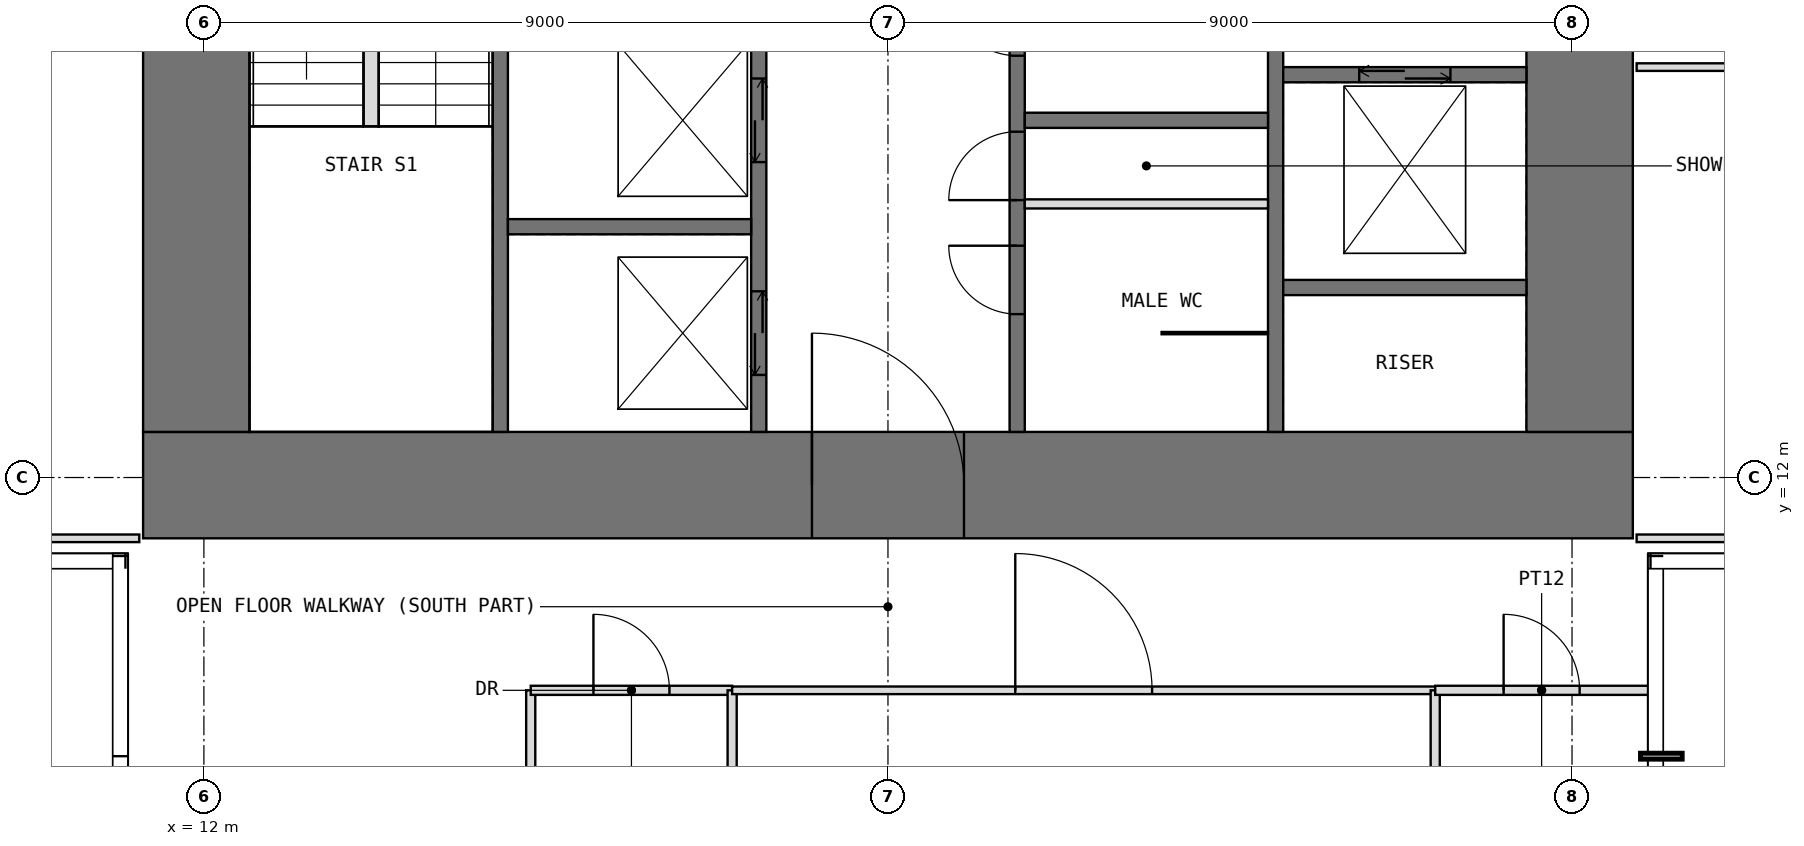
"""IFC4 building model, lengths in metres.
Left out: names, types, materials, properties, quantities, classifications, styles, units other than length and angle.
Written with IfcOpenShell. Run it as: python <this file> out.ifc"""

import sys

from ifc_helpers import new_model, si_unit, direction, frame, frame_2d, origin, place, context, subcontext, project, spatial, rectangle, extrude, element, fill, save


model = new_model("IFC4")
c1 = context("Model", 3, precision=1e-05, world=origin(), true_north=direction((0.0, 1.0)))
c2 = subcontext(c1, "Body", "Model", "MODEL_VIEW")
j1 = project(units=[si_unit("LENGTHUNIT", "METRE"), si_unit("PLANEANGLEUNIT", "RADIAN")], contexts=[c1])
p1 = place(None, origin())
s1 = spatial("IfcSite", under=j1, at=p1, CompositionType="ELEMENT")
p2 = place(p1, origin())
s2 = spatial("IfcBuilding", under=s1, at=p2, CompositionType="ELEMENT")
p3 = place(p2, frame((0.0, 0.0, 170.5)))
s3 = spatial("IfcBuildingStorey", under=s2, at=p3, CompositionType="ELEMENT", Elevation=170.5)
p4 = place(p3, frame((11.2, 11.9, -0.05), z_axis=(0.0, 0.0, 1.0), x_axis=(1.0, 0.0, 0.0)))
e1 = element("IfcWall", 1, at=p4, inside=s3, PredefinedType="SHEAR", context=c2, shape_type="SweptSolid", body=[
    extrude(rectangle(XDim=19.6, YDim=1.4, at=frame_2d((9.8, 0.0))), origin(), (0.0, 0.0, 1.0), 4.0),
])
p5 = place(p4, frame((8.8, 0.0, 0.05)))
e2 = element("IfcOpeningElement", 2, at=p5, cuts=e1, PredefinedType="OPENING", context=c2, shape_type="SweptSolid", body=[
    extrude(rectangle(XDim=2.0, YDim=2.2, at=frame_2d((1.0, 1.1))), frame((0.0, 0.71, 0.0), z_axis=(0.0, -1.0, 0.0), x_axis=(1.0, 0.0, 0.0)), (0.0, 0.0, 1.0), 1.42),
])
p6 = place(p3, frame((11.9, 12.6, -0.05), z_axis=(0.0, 0.0, 1.0), x_axis=(0.0, 1.0, 0.0)))
e3 = element("IfcWall", 3, at=p6, inside=s3, PredefinedType="SHEAR", context=c2, shape_type="SweptSolid", body=[
    extrude(rectangle(XDim=16.8, YDim=1.4, at=frame_2d((8.4, 0.0))), origin(), (0.0, 0.0, 1.0), 4.0),
])
p7 = place(p6, frame((9.9, 0.0, 0.05)))
e4 = element("IfcOpeningElement", 4, at=p7, cuts=e3, PredefinedType="OPENING", context=c2, shape_type="SweptSolid", body=[
    extrude(rectangle(XDim=1.0, YDim=2.2, at=frame_2d((0.5, 1.1))), frame((0.0, 0.71, 0.0), z_axis=(0.0, -1.0, 0.0), x_axis=(1.0, 0.0, 0.0)), (0.0, 0.0, 1.0), 1.42),
])
p8 = place(p3, frame((30.1, 12.6, -0.05), z_axis=(0.0, 0.0, 1.0), x_axis=(0.0, 1.0, 0.0)))
e5 = element("IfcWall", 5, at=p8, inside=s3, PredefinedType="SHEAR", context=c2, shape_type="SweptSolid", body=[
    extrude(rectangle(XDim=16.8, YDim=1.4, at=frame_2d((8.4, 0.0))), origin(), (0.0, 0.0, 1.0), 4.0),
])
p9 = place(p8, frame((5.9, 0.0, 0.05)))
e6 = element("IfcOpeningElement", 6, at=p9, cuts=e5, PredefinedType="OPENING", context=c2, shape_type="SweptSolid", body=[
    extrude(rectangle(XDim=1.0, YDim=2.2, at=frame_2d((0.5, 1.1))), frame((0.0, 0.71, 0.0), z_axis=(0.0, -1.0, 0.0), x_axis=(1.0, 0.0, 0.0)), (0.0, 0.0, 1.0), 1.42),
])
p10 = place(p3, frame((15.9, 12.6, -0.05), z_axis=(0.0, 0.0, 1.0), x_axis=(0.0, 1.0, 0.0)))
e7 = element("IfcWall", 7, at=p10, inside=s3, PredefinedType="SHEAR", context=c2, shape_type="SweptSolid", body=[
    extrude(rectangle(XDim=16.8, YDim=0.2, at=frame_2d((8.4, 0.0))), origin(), (0.0, 0.0, 1.0), 4.0),
])
p11 = place(p10, frame((8.9, 0.0, 0.05)))
e8 = element("IfcOpeningElement", 8, at=p11, cuts=e7, PredefinedType="OPENING", context=c2, shape_type="SweptSolid", body=[
    extrude(rectangle(XDim=1.0, YDim=2.2, at=frame_2d((0.5, 1.1))), frame((0.0, 0.11, 0.0), z_axis=(0.0, -1.0, 0.0), x_axis=(1.0, 0.0, 0.0)), (0.0, 0.0, 1.0), 0.22),
])
p12 = place(p3, frame((19.3, 12.6, -0.05), z_axis=(0.0, 0.0, 1.0), x_axis=(0.0, 1.0, 0.0)))
e9 = element("IfcWall", 9, at=p12, inside=s3, PredefinedType="SHEAR", context=c2, shape_type="SweptSolid", body=[
    extrude(rectangle(XDim=16.8, YDim=0.2, at=frame_2d((8.4, 0.0))), origin(), (0.0, 0.0, 1.0), 4.0),
])
p13 = place(p12, frame((8.7, 0.0, 0.05)))
e10 = element("IfcOpeningElement", 10, at=p13, cuts=e9, PredefinedType="OPENING", context=c2, shape_type="SweptSolid", body=[
    extrude(rectangle(XDim=1.0, YDim=2.2, at=frame_2d((0.5, 1.1))), frame((0.0, 0.11, 0.0), z_axis=(0.0, -1.0, 0.0), x_axis=(1.0, 0.0, 0.0)), (0.0, 0.0, 1.0), 0.22),
])
p14 = place(p12, frame((10.85, 0.0, 0.05)))
e11 = element("IfcOpeningElement", 11, at=p14, cuts=e9, PredefinedType="OPENING", context=c2, shape_type="SweptSolid", body=[
    extrude(rectangle(XDim=0.9, YDim=2.2, at=frame_2d((0.45, 1.1))), frame((0.0, 0.11, 0.0), z_axis=(0.0, -1.0, 0.0), x_axis=(1.0, 0.0, 0.0)), (0.0, 0.0, 1.0), 0.22),
])
p15 = place(p12, frame((13.3, 0.0, 0.05)))
e12 = element("IfcOpeningElement", 12, at=p15, cuts=e9, PredefinedType="OPENING", context=c2, shape_type="SweptSolid", body=[
    extrude(rectangle(XDim=1.0, YDim=2.2, at=frame_2d((0.5, 1.1))), frame((0.0, 0.11, 0.0), z_axis=(0.0, -1.0, 0.0), x_axis=(1.0, 0.0, 0.0)), (0.0, 0.0, 1.0), 0.22),
])
p16 = place(p12, frame((15.55, 0.0, 0.05)))
e13 = element("IfcOpeningElement", 13, at=p16, cuts=e9, PredefinedType="OPENING", context=c2, shape_type="SweptSolid", body=[
    extrude(rectangle(XDim=0.9, YDim=2.2, at=frame_2d((0.45, 1.1))), frame((0.0, 0.11, 0.0), z_axis=(0.0, -1.0, 0.0), x_axis=(1.0, 0.0, 0.0)), (0.0, 0.0, 1.0), 0.22),
])
p17 = place(p12, frame((0.75, 0.0, 0.05)))
e14 = element("IfcOpeningElement", 14, at=p17, cuts=e9, PredefinedType="OPENING", context=c2, shape_type="SweptSolid", body=[
    extrude(rectangle(XDim=1.1, YDim=2.2, at=frame_2d((0.55, 1.1))), frame((0.0, 0.11, 0.0), z_axis=(0.0, -1.0, 0.0), x_axis=(1.0, 0.0, 0.0)), (0.0, 0.0, 1.0), 0.22),
])
p18 = place(p12, frame((3.55, 0.0, 0.05)))
e15 = element("IfcOpeningElement", 15, at=p18, cuts=e9, PredefinedType="OPENING", context=c2, shape_type="SweptSolid", body=[
    extrude(rectangle(XDim=1.1, YDim=2.2, at=frame_2d((0.55, 1.1))), frame((0.0, 0.11, 0.0), z_axis=(0.0, -1.0, 0.0), x_axis=(1.0, 0.0, 0.0)), (0.0, 0.0, 1.0), 0.22),
])
p19 = place(p12, frame((6.35, 0.0, 0.05)))
e16 = element("IfcOpeningElement", 16, at=p19, cuts=e9, PredefinedType="OPENING", context=c2, shape_type="SweptSolid", body=[
    extrude(rectangle(XDim=1.1, YDim=2.2, at=frame_2d((0.55, 1.1))), frame((0.0, 0.11, 0.0), z_axis=(0.0, -1.0, 0.0), x_axis=(1.0, 0.0, 0.0)), (0.0, 0.0, 1.0), 0.22),
])
p20 = place(p3, frame((22.7, 12.6, -0.05), z_axis=(0.0, 0.0, 1.0), x_axis=(0.0, 1.0, 0.0)))
e17 = element("IfcWall", 17, at=p20, inside=s3, PredefinedType="SHEAR", context=c2, shape_type="SweptSolid", body=[
    extrude(rectangle(XDim=16.8, YDim=0.2, at=frame_2d((8.4, 0.0))), origin(), (0.0, 0.0, 1.0), 4.0),
])
p21 = place(p20, frame((3.05, 0.0, 0.05)))
e18 = element("IfcOpeningElement", 18, at=p21, cuts=e17, PredefinedType="OPENING", context=c2, shape_type="SweptSolid", body=[
    extrude(rectangle(XDim=0.9, YDim=2.2, at=frame_2d((0.45, 1.1))), frame((0.0, 0.11, 0.0), z_axis=(0.0, -1.0, 0.0), x_axis=(1.0, 0.0, 0.0)), (0.0, 0.0, 1.0), 0.22),
])
p22 = place(p20, frame((7.1, 0.0, 0.05)))
e19 = element("IfcOpeningElement", 19, at=p22, cuts=e17, PredefinedType="OPENING", context=c2, shape_type="SweptSolid", body=[
    extrude(rectangle(XDim=1.0, YDim=2.2, at=frame_2d((0.5, 1.1))), frame((0.0, 0.11, 0.0), z_axis=(0.0, -1.0, 0.0), x_axis=(1.0, 0.0, 0.0)), (0.0, 0.0, 1.0), 0.22),
])
p23 = place(p20, frame((1.55, 0.0, 0.05)))
e20 = element("IfcOpeningElement", 20, at=p23, cuts=e17, PredefinedType="OPENING", context=c2, shape_type="SweptSolid", body=[
    extrude(rectangle(XDim=0.9, YDim=2.2, at=frame_2d((0.45, 1.1))), frame((0.0, 0.11, 0.0), z_axis=(0.0, -1.0, 0.0), x_axis=(1.0, 0.0, 0.0)), (0.0, 0.0, 1.0), 0.22),
])
p24 = place(p20, frame((4.95, 0.0, 0.05)))
e21 = element("IfcOpeningElement", 21, at=p24, cuts=e17, PredefinedType="OPENING", context=c2, shape_type="SweptSolid", body=[
    extrude(rectangle(XDim=0.9, YDim=2.2, at=frame_2d((0.45, 1.1))), frame((0.0, 0.11, 0.0), z_axis=(0.0, -1.0, 0.0), x_axis=(1.0, 0.0, 0.0)), (0.0, 0.0, 1.0), 0.22),
])
p25 = place(p20, frame((9.4, 0.0, 0.05)))
e22 = element("IfcOpeningElement", 22, at=p25, cuts=e17, PredefinedType="OPENING", context=c2, shape_type="SweptSolid", body=[
    extrude(rectangle(XDim=1.0, YDim=2.2, at=frame_2d((0.5, 1.1))), frame((0.0, 0.11, 0.0), z_axis=(0.0, -1.0, 0.0), x_axis=(1.0, 0.0, 0.0)), (0.0, 0.0, 1.0), 0.22),
])
p26 = place(p20, frame((12.2, 0.0, 0.05)))
e23 = element("IfcOpeningElement", 23, at=p26, cuts=e17, PredefinedType="OPENING", context=c2, shape_type="SweptSolid", body=[
    extrude(rectangle(XDim=1.0, YDim=2.2, at=frame_2d((0.5, 1.1))), frame((0.0, 0.11, 0.0), z_axis=(0.0, -1.0, 0.0), x_axis=(1.0, 0.0, 0.0)), (0.0, 0.0, 1.0), 0.22),
])
p27 = place(p3, frame((26.1, 12.6, -0.05), z_axis=(0.0, 0.0, 1.0), x_axis=(0.0, 1.0, 0.0)))
e24 = element("IfcWall", 24, at=p27, inside=s3, PredefinedType="SHEAR", context=c2, shape_type="SweptSolid", body=[
    extrude(rectangle(XDim=16.8, YDim=0.2, at=frame_2d((8.4, 0.0))), origin(), (0.0, 0.0, 1.0), 4.0),
])
p28 = place(p27, frame((6.9, 0.0, 0.05)))
e25 = element("IfcOpeningElement", 25, at=p28, cuts=e24, PredefinedType="OPENING", context=c2, shape_type="SweptSolid", body=[
    extrude(rectangle(XDim=1.0, YDim=2.2, at=frame_2d((0.5, 1.1))), frame((0.0, 0.11, 0.0), z_axis=(0.0, -1.0, 0.0), x_axis=(1.0, 0.0, 0.0)), (0.0, 0.0, 1.0), 0.22),
])
for number, where, z_axis, x_axis in (
    (26, (16.0, 15.3, -0.05), (0.0, 0.0, 1.0), (1.0, 0.0, 0.0)),
    (27, (22.8, 16.7, -0.05), (0.0, 0.0, 1.0), (1.0, 0.0, 0.0)),
    (28, (26.2, 14.5, -0.05), (0.0, 0.0, 1.0), (1.0, 0.0, 0.0)),
):
    element("IfcWall", number, at=place(p3, frame(where, z_axis=z_axis, x_axis=x_axis)), inside=s3, PredefinedType="SHEAR", context=c2, shape_type="SweptSolid", body=[
        extrude(rectangle(XDim=3.2, YDim=0.2, at=frame_2d((1.6, 0.0))), origin(), (0.0, 0.0, 1.0), 4.0),
    ])
p29 = place(p3, frame((26.2, 17.3, -0.05), z_axis=(0.0, 0.0, 1.0), x_axis=(1.0, 0.0, 0.0)))
e29 = element("IfcWall", 29, at=p29, inside=s3, PredefinedType="SHEAR", context=c2, shape_type="SweptSolid", body=[
    extrude(rectangle(XDim=3.2, YDim=0.2, at=frame_2d((1.6, 0.0))), origin(), (0.0, 0.0, 1.0), 4.0),
])
p30 = place(p29, frame((1.0, 0.0, 0.05)))
e30 = element("IfcOpeningElement", 30, at=p30, cuts=e29, PredefinedType="OPENING", context=c2, shape_type="SweptSolid", body=[
    extrude(rectangle(XDim=1.2, YDim=2.2, at=frame_2d((0.6, 1.1))), frame((0.0, 0.11, 0.0), z_axis=(0.0, -1.0, 0.0), x_axis=(1.0, 0.0, 0.0)), (0.0, 0.0, 1.0), 0.22),
])
p31 = place(p3, frame((22.8, 15.6, 0.0), z_axis=(0.0, 0.0, 1.0), x_axis=(1.0, 0.0, 0.0)))
e31 = element("IfcWall", 31, at=p31, inside=s3, PredefinedType="PARTITIONING", context=c2, shape_type="SweptSolid", body=[
    extrude(rectangle(XDim=3.2, YDim=0.12, at=frame_2d((1.6, 0.0))), origin(), (0.0, 0.0, 1.0), 3.75),
])
p32 = place(p3, frame((24.6, 13.9, 0.0), z_axis=(0.0, 0.0, 1.0), x_axis=(1.0, 0.0, 0.0)))
e32 = element("IfcWall", 32, at=p32, inside=s3, PredefinedType="PARTITIONING", context=c2, shape_type="SweptSolid", body=[
    extrude(rectangle(XDim=1.4, YDim=0.03, at=frame_2d((0.7, 0.0))), origin(), (0.0, 0.0, 1.0), 3.75),
])
p33 = place(p3, frame((7.4, 11.2, 0.0), z_axis=(0.0, 0.0, 1.0), x_axis=(1.0, 0.0, 0.0)))
e33 = element("IfcWall", 33, at=p33, inside=s3, PredefinedType="PARTITIONING", context=c2, shape_type="SweptSolid", body=[
    extrude(rectangle(XDim=3.75, YDim=0.1, at=frame_2d((1.875, 0.0))), origin(), (0.0, 0.0, 1.0), 3.75),
])
p34 = place(p3, frame((16.3, 3.0, 0.0), z_axis=(0.0, 0.0, 1.0), x_axis=(0.0, 1.0, 0.0)))
e34 = element("IfcWall", 34, at=p34, inside=s3, PredefinedType="PARTITIONING", context=c2, shape_type="SweptSolid", body=[
    extrude(rectangle(XDim=6.2, YDim=0.12, at=frame_2d((3.1, 0.0))), origin(), (0.0, 0.0, 1.0), 3.75),
])
p35 = place(p3, frame((16.3, 9.2, 0.0), z_axis=(0.0, 0.0, 1.0), x_axis=(1.0, 0.0, 0.0)))
e35 = element("IfcWall", 35, at=p35, inside=s3, PredefinedType="PARTITIONING", context=c2, shape_type="SweptSolid", body=[
    extrude(rectangle(XDim=2.65, YDim=0.12, at=frame_2d((1.325, 0.0))), origin(), (0.0, 0.0, 1.0), 3.75),
])
p36 = place(p35, frame((0.825, 0.0, 0.0)))
e36 = element("IfcOpeningElement", 36, at=p36, cuts=e35, PredefinedType="OPENING", context=c2, shape_type="SweptSolid", body=[
    extrude(rectangle(XDim=1.0, YDim=2.2, at=frame_2d((0.5, 1.1))), frame((0.0, 0.07, 0.0), z_axis=(0.0, -1.0, 0.0), x_axis=(1.0, 0.0, 0.0)), (0.0, 0.0, 1.0), 0.14),
])
p37 = place(p3, frame((18.95, 3.0, 0.0), z_axis=(0.0, 0.0, 1.0), x_axis=(0.0, 1.0, 0.0)))
e37 = element("IfcWall", 37, at=p37, inside=s3, PredefinedType="PARTITIONING", context=c2, shape_type="SweptSolid", body=[
    extrude(rectangle(XDim=6.2, YDim=0.12, at=frame_2d((3.1, 0.0))), origin(), (0.0, 0.0, 1.0), 3.75),
])
p38 = place(p3, frame((18.95, 9.2, 0.0), z_axis=(0.0, 0.0, 1.0), x_axis=(1.0, 0.0, 0.0)))
e38 = element("IfcWall", 38, at=p38, inside=s3, PredefinedType="PARTITIONING", context=c2, shape_type="SweptSolid", body=[
    extrude(rectangle(XDim=9.25, YDim=0.1, at=frame_2d((4.625, 0.0))), origin(), (0.0, 0.0, 1.0), 3.75),
])
p39 = place(p38, frame((3.725, 0.0, 0.0)))
e39 = element("IfcOpeningElement", 39, at=p39, cuts=e38, PredefinedType="OPENING", context=c2, shape_type="SweptSolid", body=[
    extrude(rectangle(XDim=1.8, YDim=2.4, at=frame_2d((0.9, 1.2))), frame((0.0, 0.06, 0.0), z_axis=(0.0, -1.0, 0.0), x_axis=(1.0, 0.0, 0.0)), (0.0, 0.0, 1.0), 0.12),
])
p40 = place(p3, frame((28.2, 3.0, 0.0), z_axis=(0.0, 0.0, 1.0), x_axis=(0.0, 1.0, 0.0)))
e40 = element("IfcWall", 40, at=p40, inside=s3, PredefinedType="PARTITIONING", context=c2, shape_type="SweptSolid", body=[
    extrude(rectangle(XDim=6.2, YDim=0.12, at=frame_2d((3.1, 0.0))), origin(), (0.0, 0.0, 1.0), 3.75),
])
p41 = place(p3, frame((28.2, 9.2, 0.0), z_axis=(0.0, 0.0, 1.0), x_axis=(1.0, 0.0, 0.0)))
e41 = element("IfcWall", 41, at=p41, inside=s3, PredefinedType="PARTITIONING", context=c2, shape_type="SweptSolid", body=[
    extrude(rectangle(XDim=2.8, YDim=0.12, at=frame_2d((1.4, 0.0))), origin(), (0.0, 0.0, 1.0), 3.75),
])
p42 = place(p41, frame((0.9, 0.0, 0.0)))
e42 = element("IfcOpeningElement", 42, at=p42, cuts=e41, PredefinedType="OPENING", context=c2, shape_type="SweptSolid", body=[
    extrude(rectangle(XDim=1.0, YDim=2.2, at=frame_2d((0.5, 1.1))), frame((0.0, 0.07, 0.0), z_axis=(0.0, -1.0, 0.0), x_axis=(1.0, 0.0, 0.0)), (0.0, 0.0, 1.0), 0.14),
])
for number, where, z_axis, x_axis in (
    (43, (30.85, 11.2, 0.0), (0.0, 0.0, 1.0), (1.0, 0.0, 0.0)),
    (44, (30.85, 17.4, 0.0), (0.0, 0.0, 1.0), (1.0, 0.0, 0.0)),
):
    element("IfcWall", number, at=place(p3, frame(where, z_axis=z_axis, x_axis=x_axis)), inside=s3, PredefinedType="PARTITIONING", context=c2, shape_type="SweptSolid", body=[
        extrude(rectangle(XDim=5.35, YDim=0.1, at=frame_2d((2.675, 0.0))), origin(), (0.0, 0.0, 1.0), 3.75),
    ])
p43 = place(p3, frame((14.2, 16.62, 0.0), z_axis=(0.0, 0.0, 1.0), x_axis=(0.0, 1.0, 0.0)))
e45 = element("IfcWall", 45, at=p43, inside=s3, PredefinedType="PARTITIONING", context=c2, shape_type="SweptSolid", body=[
    extrude(rectangle(XDim=3.08, YDim=0.2, at=frame_2d((1.54, 0.0))), origin(), (0.0, 0.0, 1.0), 4.0),
])
p44 = place(p5, origin())
e46 = element("IfcDoor", 46, at=p44, inside=s3, OperationType="DOUBLE_DOOR_SINGLE_SWING", PredefinedType="DOOR", context=c2, shape_type="SweptSolid", body=[
    extrude(rectangle(XDim=2.0, YDim=2.2, at=frame_2d((1.0, 1.1))), frame((0.0, 0.025, 0.0), z_axis=(0.0, -1.0, 0.0), x_axis=(1.0, 0.0, 0.0)), (0.0, 0.0, 1.0), 0.05),
])
fill(e2, e46)
p45 = place(p21, origin())
e47 = element("IfcDoor", 47, at=p45, inside=s3, OperationType="SINGLE_SWING_LEFT", PredefinedType="DOOR", context=c2, shape_type="SweptSolid", body=[
    extrude(rectangle(XDim=0.9, YDim=2.2, at=frame_2d((0.45, 1.1))), frame((0.0, 0.025, 0.0), z_axis=(0.0, -1.0, 0.0), x_axis=(1.0, 0.0, 0.0)), (0.0, 0.0, 1.0), 0.05),
])
fill(e18, e47)
p46 = place(p23, origin())
e48 = element("IfcDoor", 48, at=p46, inside=s3, OperationType="SINGLE_SWING_RIGHT", PredefinedType="DOOR", context=c2, shape_type="SweptSolid", body=[
    extrude(rectangle(XDim=0.9, YDim=2.2, at=frame_2d((0.45, 1.1))), frame((0.0, 0.025, 0.0), z_axis=(0.0, -1.0, 0.0), x_axis=(1.0, 0.0, 0.0)), (0.0, 0.0, 1.0), 0.05),
])
fill(e20, e48)
p47 = place(p24, origin())
e49 = element("IfcDoor", 49, at=p47, inside=s3, OperationType="SINGLE_SWING_RIGHT", PredefinedType="DOOR", context=c2, shape_type="SweptSolid", body=[
    extrude(rectangle(XDim=0.9, YDim=2.2, at=frame_2d((0.45, 1.1))), frame((0.0, 0.025, 0.0), z_axis=(0.0, -1.0, 0.0), x_axis=(1.0, 0.0, 0.0)), (0.0, 0.0, 1.0), 0.05),
])
fill(e21, e49)
p48 = place(p36, origin())
e50 = element("IfcDoor", 50, at=p48, inside=s3, OperationType="SINGLE_SWING_LEFT", PredefinedType="DOOR", context=c2, shape_type="SweptSolid", body=[
    extrude(rectangle(XDim=1.0, YDim=2.2, at=frame_2d((0.5, 1.1))), frame((0.0, 0.025, 0.0), z_axis=(0.0, -1.0, 0.0), x_axis=(1.0, 0.0, 0.0)), (0.0, 0.0, 1.0), 0.05),
])
fill(e36, e50)
p49 = place(p39, origin())
e51 = element("IfcDoor", 51, at=p49, inside=s3, OperationType="DOUBLE_DOOR_SINGLE_SWING", PredefinedType="DOOR", context=c2, shape_type="SweptSolid", body=[
    extrude(rectangle(XDim=1.8, YDim=2.4, at=frame_2d((0.9, 1.2))), frame((0.0, 0.025, 0.0), z_axis=(0.0, -1.0, 0.0), x_axis=(1.0, 0.0, 0.0)), (0.0, 0.0, 1.0), 0.05),
])
fill(e39, e51)
p50 = place(p42, origin())
e52 = element("IfcDoor", 52, at=p50, inside=s3, OperationType="SINGLE_SWING_LEFT", PredefinedType="DOOR", context=c2, shape_type="SweptSolid", body=[
    extrude(rectangle(XDim=1.0, YDim=2.2, at=frame_2d((0.5, 1.1))), frame((0.0, 0.025, 0.0), z_axis=(0.0, -1.0, 0.0), x_axis=(1.0, 0.0, 0.0)), (0.0, 0.0, 1.0), 0.05),
])
fill(e42, e52)
p51 = place(p17, origin())
e53 = element("IfcDoor", 53, at=p51, inside=s3, OperationType="DOUBLE_DOOR_SLIDING", PredefinedType="DOOR", context=c2, shape_type="SweptSolid", body=[
    extrude(rectangle(XDim=1.1, YDim=2.2, at=frame_2d((0.55, 1.1))), frame((0.0, 0.025, 0.0), z_axis=(0.0, -1.0, 0.0), x_axis=(1.0, 0.0, 0.0)), (0.0, 0.0, 1.0), 0.05),
])
fill(e14, e53)
p52 = place(p18, origin())
e54 = element("IfcDoor", 54, at=p52, inside=s3, OperationType="DOUBLE_DOOR_SLIDING", PredefinedType="DOOR", context=c2, shape_type="SweptSolid", body=[
    extrude(rectangle(XDim=1.1, YDim=2.2, at=frame_2d((0.55, 1.1))), frame((0.0, 0.025, 0.0), z_axis=(0.0, -1.0, 0.0), x_axis=(1.0, 0.0, 0.0)), (0.0, 0.0, 1.0), 0.05),
])
fill(e15, e54)
p53 = place(p30, origin())
e55 = element("IfcDoor", 55, at=p53, inside=s3, OperationType="DOUBLE_DOOR_SLIDING", PredefinedType="DOOR", context=c2, shape_type="SweptSolid", body=[
    extrude(rectangle(XDim=1.2, YDim=2.2, at=frame_2d((0.6, 1.1))), frame((0.0, 0.025, 0.0), z_axis=(0.0, -1.0, 0.0), x_axis=(1.0, 0.0, 0.0)), (0.0, 0.0, 1.0), 0.05),
])
fill(e30, e55)
save(model, sys.argv[1])
